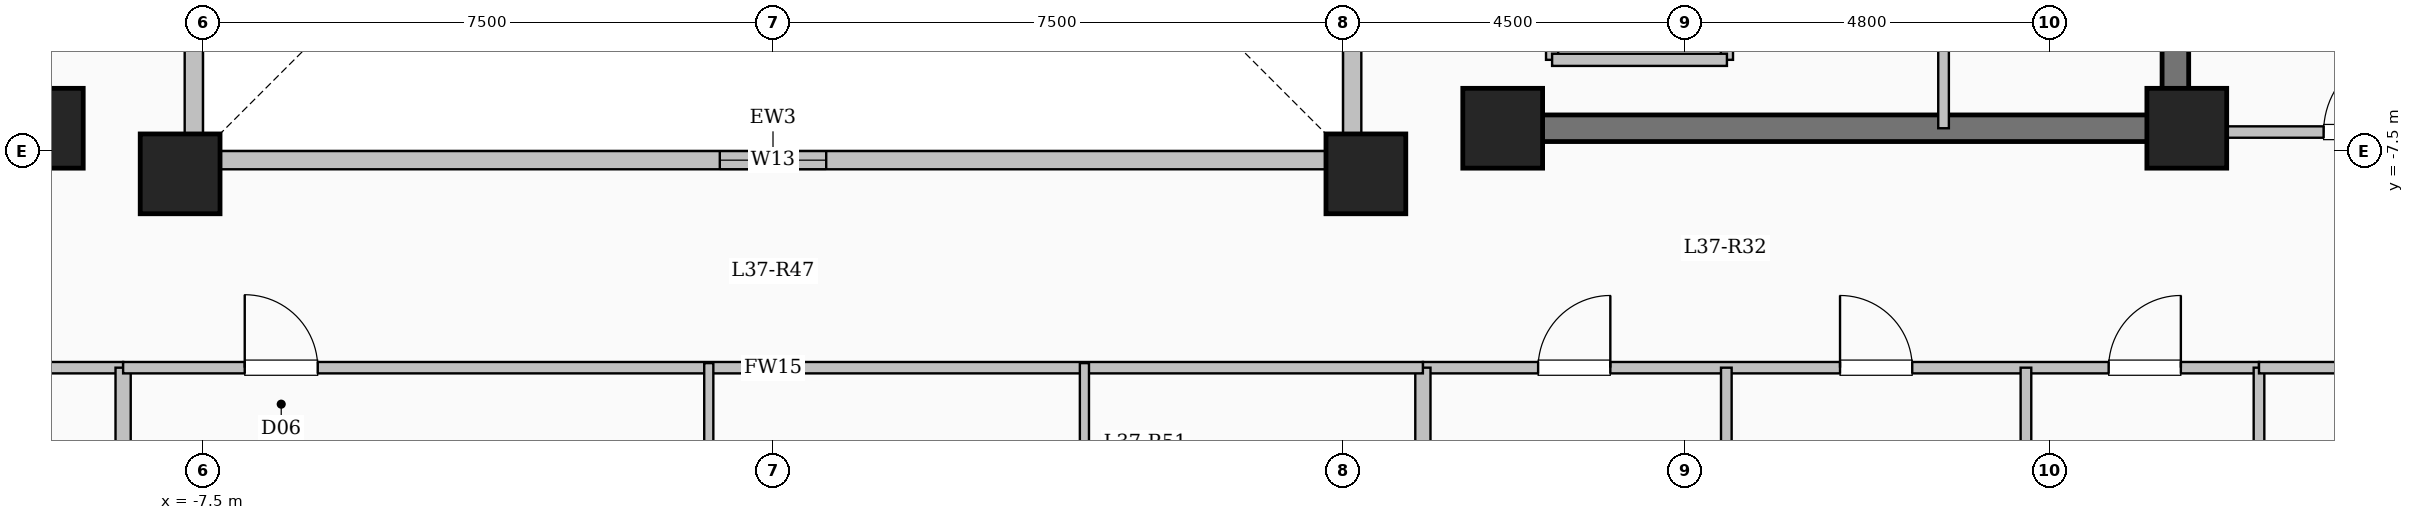
"""IFC4 building model, lengths in metres.
Left out: names, types, materials, properties, quantities, classifications, styles, units other than length and angle.
Written with IfcOpenShell. Run it as: python <this file> out.ifc"""

import sys

from ifc_helpers import new_model, si_unit, direction, frame, frame_2d, origin, origin_2d, place, context, subcontext, project, spatial, rectangle, extrude, element, fill, save


model = new_model("IFC4")
c1 = context("Model", 3, precision=1e-05, world=origin(), true_north=direction((0.0, 1.0)))
c2 = subcontext(c1, "Body", "Model", "MODEL_VIEW")
j1 = project(units=[si_unit("LENGTHUNIT", "METRE"), si_unit("PLANEANGLEUNIT", "RADIAN")], contexts=[c1])
p1 = place(None, origin())
s1 = spatial("IfcSite", under=j1, at=p1, CompositionType="ELEMENT")
p2 = place(p1, origin())
s2 = spatial("IfcBuilding", under=s1, at=p2, CompositionType="ELEMENT")
p3 = place(p2, frame((0.0, 0.0, 139.3)))
s3 = spatial("IfcBuildingStorey", under=s2, at=p3, CompositionType="ELEMENT", Elevation=139.3)
for number, where, z_axis, x_axis in (
    (1, (-7.8, -7.8, 0.0), (0.0, 0.0, 1.0), (1.0, 0.0, 0.0)),
    (2, (7.8, -7.8, 0.0), (0.0, 0.0, 1.0), (1.0, 0.0, 0.0)),
    (3, (-9.6, -7.2, 0.0), (0.0, 0.0, 1.0), (1.0, 0.0, 0.0)),
    (4, (9.6, -7.2, 0.0), (0.0, 0.0, 1.0), (1.0, 0.0, 0.0)),
    (5, (18.6, -7.2, 0.0), (0.0, 0.0, 1.0), (1.0, 0.0, 0.0)),
):
    element("IfcColumn", number, at=place(p3, frame(where, z_axis=z_axis, x_axis=x_axis)), inside=s3, PredefinedType="COLUMN", context=c2, shape_type="SweptSolid", body=[
        extrude(rectangle(XDim=1.05, YDim=1.05, at=origin_2d()), origin(), (0.0, 0.0, 1.0), 3.35),
    ])
p4 = place(p3, frame((-7.62, -7.62, 0.0), z_axis=(0.0, 0.0, 1.0), x_axis=(1.0, 0.0, 0.0)))
e6 = element("IfcWall", 6, at=p4, inside=s3, PredefinedType="SOLIDWALL", context=c2, shape_type="SweptSolid", body=[
    extrude(rectangle(XDim=15.24, YDim=0.24, at=frame_2d((7.62, 0.0))), origin(), (0.0, 0.0, 1.0), 3.1),
])
p5 = place(p4, frame((6.92, 0.0, 0.95)))
e7 = element("IfcOpeningElement", 7, at=p5, cuts=e6, PredefinedType="OPENING", context=c2, shape_type="SweptSolid", body=[
    extrude(rectangle(XDim=1.4, YDim=1.5, at=frame_2d((0.7, 0.75))), frame((0.0, 0.13, 0.0), z_axis=(0.0, -1.0, 0.0), x_axis=(1.0, 0.0, 0.0)), (0.0, 0.0, 1.0), 0.26),
])
p6 = place(p3, frame((7.62, -7.62, 0.0), z_axis=(0.0, 0.0, 1.0), x_axis=(0.0, 1.0, 0.0)))
e8 = element("IfcWall", 8, at=p6, inside=s3, PredefinedType="SOLIDWALL", context=c2, shape_type="SweptSolid", body=[
    extrude(rectangle(XDim=15.24, YDim=0.24, at=frame_2d((7.62, 0.0))), origin(), (0.0, 0.0, 1.0), 3.1),
])
p7 = place(p6, frame((6.92, 0.0, 0.95)))
e9 = element("IfcOpeningElement", 9, at=p7, cuts=e8, PredefinedType="OPENING", context=c2, shape_type="SweptSolid", body=[
    extrude(rectangle(XDim=1.4, YDim=1.5, at=frame_2d((0.7, 0.75))), frame((0.0, 0.13, 0.0), z_axis=(0.0, -1.0, 0.0), x_axis=(1.0, 0.0, 0.0)), (0.0, 0.0, 1.0), 0.26),
])
p8 = place(p3, frame((-7.62, 7.62, 0.0), z_axis=(0.0, 0.0, 1.0), x_axis=(0.0, -1.0, 0.0)))
e10 = element("IfcWall", 10, at=p8, inside=s3, PredefinedType="SOLIDWALL", context=c2, shape_type="SweptSolid", body=[
    extrude(rectangle(XDim=15.24, YDim=0.24, at=frame_2d((7.62, 0.0))), origin(), (0.0, 0.0, 1.0), 3.1),
])
p9 = place(p8, frame((6.92, 0.0, 0.95)))
e11 = element("IfcOpeningElement", 11, at=p9, cuts=e10, PredefinedType="OPENING", context=c2, shape_type="SweptSolid", body=[
    extrude(rectangle(XDim=1.4, YDim=1.5, at=frame_2d((0.7, 0.75))), frame((0.0, 0.13, 0.0), z_axis=(0.0, -1.0, 0.0), x_axis=(1.0, 0.0, 0.0)), (0.0, 0.0, 1.0), 0.26),
])
p10 = place(p3, frame((10.25, -6.3, 0.0), z_axis=(0.0, 0.0, 1.0), x_axis=(0.0, 1.0, 0.0)))
e12 = element("IfcWall", 12, at=p10, inside=s3, PredefinedType="SOLIDWALL", context=c2, shape_type="SweptSolid", body=[
    extrude(rectangle(XDim=2.6, YDim=0.16, at=frame_2d((1.3, 0.0))), origin(), (0.0, 0.0, 1.0), 3.1),
])
p11 = place(p10, frame((0.75, 0.0, 0.0)))
e13 = element("IfcOpeningElement", 13, at=p11, cuts=e12, PredefinedType="OPENING", context=c2, shape_type="SweptSolid", body=[
    extrude(rectangle(XDim=1.1, YDim=2.15, at=frame_2d((0.55, 1.075))), frame((0.0, 0.09, 0.0), z_axis=(0.0, -1.0, 0.0), x_axis=(1.0, 0.0, 0.0)), (0.0, 0.0, 1.0), 0.18),
])
p12 = place(p3, frame((12.55, -6.3, 0.0), z_axis=(0.0, 0.0, 1.0), x_axis=(0.0, 1.0, 0.0)))
e14 = element("IfcWall", 14, at=p12, inside=s3, PredefinedType="SOLIDWALL", context=c2, shape_type="SweptSolid", body=[
    extrude(rectangle(XDim=2.6, YDim=0.16, at=frame_2d((1.3, 0.0))), origin(), (0.0, 0.0, 1.0), 3.1),
])
p13 = place(p3, frame((10.25, -6.3, 0.0), z_axis=(0.0, 0.0, 1.0), x_axis=(1.0, 0.0, 0.0)))
e15 = element("IfcWall", 15, at=p13, inside=s3, PredefinedType="SOLIDWALL", context=c2, shape_type="SweptSolid", body=[
    extrude(rectangle(XDim=2.3, YDim=0.16, at=frame_2d((1.15, 0.0))), origin(), (0.0, 0.0, 1.0), 3.1),
])
p14 = place(p3, frame((18.45, -7.375, 0.0), z_axis=(0.0, 0.0, 1.0), x_axis=(0.0, 1.0, 0.0)))
e16 = element("IfcWall", 16, at=p14, inside=s3, PredefinedType="SHEAR", context=c2, shape_type="SweptSolid", body=[
    extrude(rectangle(XDim=14.05, YDim=0.35, at=frame_2d((7.025, 0.0))), origin(), (0.0, 0.0, 1.0), 3.35),
])
p15 = place(p3, frame((10.075, -7.2, 0.0), z_axis=(0.0, 0.0, 1.0), x_axis=(1.0, 0.0, 0.0)))
e17 = element("IfcWall", 17, at=p15, inside=s3, PredefinedType="SHEAR", context=c2, shape_type="SweptSolid", body=[
    extrude(rectangle(XDim=8.55, YDim=0.35, at=frame_2d((4.275, 0.0))), origin(), (0.0, 0.0, 1.0), 3.35),
])
p16 = place(p3, frame((15.4, -7.2, 0.0), z_axis=(0.0, 0.0, 1.0), x_axis=(0.0, 1.0, 0.0)))
e18 = element("IfcWall", 18, at=p16, inside=s3, PredefinedType="PARTITIONING", context=c2, shape_type="SweptSolid", body=[
    extrude(rectangle(XDim=10.45, YDim=0.14, at=frame_2d((5.225, 0.0))), origin(), (0.0, 0.0, 1.0), 3.1),
])
p17 = place(p16, frame((9.25, 0.0, 0.0)))
e19 = element("IfcOpeningElement", 19, at=p17, cuts=e18, PredefinedType="OPENING", context=c2, shape_type="SweptSolid", body=[
    extrude(rectangle(XDim=0.9, YDim=2.08, at=frame_2d((0.45, 1.04))), frame((0.0, 0.08, 0.0), z_axis=(0.0, -1.0, 0.0), x_axis=(1.0, 0.0, 0.0)), (0.0, 0.0, 1.0), 0.16),
])
p18 = place(p3, frame((-19.55, -10.35, 0.0), z_axis=(0.0, 0.0, 1.0), x_axis=(1.0, 0.0, 0.0)))
e20 = element("IfcWall", 20, at=p18, inside=s3, PredefinedType="PARTITIONING", context=c2, shape_type="SweptSolid", body=[
    extrude(rectangle(XDim=11.0, YDim=0.15, at=frame_2d((5.5, 0.0))), origin(), (0.0, 0.0, 1.0), 3.1),
])
p19 = place(p18, frame((1.466, 0.0, 0.0)))
e21 = element("IfcOpeningElement", 21, at=p19, cuts=e20, PredefinedType="OPENING", context=c2, shape_type="SweptSolid", body=[
    extrude(rectangle(XDim=0.95, YDim=2.15, at=frame_2d((0.475, 1.075))), frame((0.0, 0.085, 0.0), z_axis=(0.0, -1.0, 0.0), x_axis=(1.0, 0.0, 0.0)), (0.0, 0.0, 1.0), 0.17),
])
p20 = place(p18, frame((5.438, 0.0, 0.0)))
e22 = element("IfcOpeningElement", 22, at=p20, cuts=e20, PredefinedType="OPENING", context=c2, shape_type="SweptSolid", body=[
    extrude(rectangle(XDim=0.95, YDim=2.15, at=frame_2d((0.475, 1.075))), frame((0.0, 0.085, 0.0), z_axis=(0.0, -1.0, 0.0), x_axis=(1.0, 0.0, 0.0)), (0.0, 0.0, 1.0), 0.17),
])
p21 = place(p18, frame((8.972, 0.0, 0.0)))
e23 = element("IfcOpeningElement", 23, at=p21, cuts=e20, PredefinedType="OPENING", context=c2, shape_type="SweptSolid", body=[
    extrude(rectangle(XDim=0.95, YDim=2.15, at=frame_2d((0.475, 1.075))), frame((0.0, 0.085, 0.0), z_axis=(0.0, -1.0, 0.0), x_axis=(1.0, 0.0, 0.0)), (0.0, 0.0, 1.0), 0.17),
])
p22 = place(p3, frame((8.55, -10.35, 0.0), z_axis=(0.0, 0.0, 1.0), x_axis=(1.0, 0.0, 0.0)))
e24 = element("IfcWall", 24, at=p22, inside=s3, PredefinedType="PARTITIONING", context=c2, shape_type="SweptSolid", body=[
    extrude(rectangle(XDim=11.0, YDim=0.15, at=frame_2d((5.5, 0.0))), origin(), (0.0, 0.0, 1.0), 3.1),
])
p23 = place(p22, frame((1.516, 0.0, 0.0)))
e25 = element("IfcOpeningElement", 25, at=p23, cuts=e24, PredefinedType="OPENING", context=c2, shape_type="SweptSolid", body=[
    extrude(rectangle(XDim=0.95, YDim=2.15, at=frame_2d((0.475, 1.075))), frame((0.0, 0.085, 0.0), z_axis=(0.0, -1.0, 0.0), x_axis=(1.0, 0.0, 0.0)), (0.0, 0.0, 1.0), 0.17),
])
p24 = place(p22, frame((5.488, 0.0, 0.0)))
e26 = element("IfcOpeningElement", 26, at=p24, cuts=e24, PredefinedType="OPENING", context=c2, shape_type="SweptSolid", body=[
    extrude(rectangle(XDim=0.95, YDim=2.15, at=frame_2d((0.475, 1.075))), frame((0.0, 0.085, 0.0), z_axis=(0.0, -1.0, 0.0), x_axis=(1.0, 0.0, 0.0)), (0.0, 0.0, 1.0), 0.17),
])
p25 = place(p22, frame((9.022, 0.0, 0.0)))
e27 = element("IfcOpeningElement", 27, at=p25, cuts=e24, PredefinedType="OPENING", context=c2, shape_type="SweptSolid", body=[
    extrude(rectangle(XDim=0.95, YDim=2.15, at=frame_2d((0.475, 1.075))), frame((0.0, 0.085, 0.0), z_axis=(0.0, -1.0, 0.0), x_axis=(1.0, 0.0, 0.0)), (0.0, 0.0, 1.0), 0.17),
])
for number, where, z_axis, x_axis in (
    (28, (12.542, -21.15, 0.0), (0.0, 0.0, 1.0), (0.0, 1.0, 0.0)),
    (29, (16.484, -21.15, 0.0), (0.0, 0.0, 1.0), (0.0, 1.0, 0.0)),
):
    element("IfcWall", number, at=place(p3, frame(where, z_axis=z_axis, x_axis=x_axis)), inside=s3, PredefinedType="PARTITIONING", context=c2, shape_type="SweptSolid", body=[
        extrude(rectangle(XDim=10.8, YDim=0.14, at=frame_2d((5.4, 0.0))), origin(), (0.0, 0.0, 1.0), 3.1),
    ])
for number, where, z_axis, x_axis in (
    (30, (-8.55, -21.804, 0.0), (0.0, 0.0, 1.0), (0.0, 1.0, 0.0)),
    (31, (8.55, -21.804, 0.0), (0.0, 0.0, 1.0), (0.0, 1.0, 0.0)),
):
    element("IfcWall", number, at=place(p3, frame(where, z_axis=z_axis, x_axis=x_axis)), inside=s3, PredefinedType="SOLIDWALL", context=c2, shape_type="SweptSolid", body=[
        extrude(rectangle(XDim=11.454, YDim=0.2, at=frame_2d((5.727, 0.0))), origin(), (0.0, 0.0, 1.0), 3.1),
    ])
p26 = place(p3, frame((-8.55, -10.35, 0.0), z_axis=(0.0, 0.0, 1.0), x_axis=(1.0, 0.0, 0.0)))
e32 = element("IfcWall", 32, at=p26, inside=s3, PredefinedType="PARTITIONING", context=c2, shape_type="SweptSolid", body=[
    extrude(rectangle(XDim=17.1, YDim=0.15, at=frame_2d((8.55, 0.0))), origin(), (0.0, 0.0, 1.0), 3.1),
])
p27 = place(p26, frame((1.6, 0.0, 0.0)))
e33 = element("IfcOpeningElement", 33, at=p27, cuts=e32, PredefinedType="OPENING", context=c2, shape_type="SweptSolid", body=[
    extrude(rectangle(XDim=0.96, YDim=2.15, at=frame_2d((0.48, 1.075))), frame((0.0, 0.085, 0.0), z_axis=(0.0, -1.0, 0.0), x_axis=(1.0, 0.0, 0.0)), (0.0, 0.0, 1.0), 0.17),
])
p28 = place(p3, frame((-0.845, -22.68, 0.0), z_axis=(0.0, 0.0, 1.0), x_axis=(0.0, 1.0, 0.0)))
e34 = element("IfcWall", 34, at=p28, inside=s3, PredefinedType="PARTITIONING", context=c2, shape_type="SweptSolid", body=[
    extrude(rectangle(XDim=12.39, YDim=0.12, at=frame_2d((6.195, 0.0))), origin(), (0.0, 0.0, 1.0), 3.1),
])
p29 = place(p28, frame((8.395, 0.0, 0.0)))
e35 = element("IfcOpeningElement", 35, at=p29, cuts=e34, PredefinedType="OPENING", context=c2, shape_type="SweptSolid", body=[
    extrude(rectangle(XDim=1.08, YDim=2.15, at=frame_2d((0.54, 1.075))), frame((0.0, 0.07, 0.0), z_axis=(0.0, -1.0, 0.0), x_axis=(1.0, 0.0, 0.0)), (0.0, 0.0, 1.0), 0.14),
])
p30 = place(p3, frame((4.097, -12.92, 0.0), z_axis=(0.0, 0.0, 1.0), x_axis=(0.0, 1.0, 0.0)))
e36 = element("IfcWall", 36, at=p30, inside=s3, PredefinedType="PARTITIONING", context=c2, shape_type="SweptSolid", body=[
    extrude(rectangle(XDim=2.63, YDim=0.12, at=frame_2d((1.315, 0.0))), origin(), (0.0, 0.0, 1.0), 3.1),
])
p31 = place(p3, frame((18.45, -7.25, 0.0), z_axis=(0.0, 0.0, 1.0), x_axis=(1.0, 0.0, 0.0)))
e37 = element("IfcWall", 37, at=p31, inside=s3, PredefinedType="PARTITIONING", context=c2, shape_type="SweptSolid", body=[
    extrude(rectangle(XDim=6.63, YDim=0.15, at=frame_2d((3.315, 0.0))), origin(), (0.0, 0.0, 1.0), 3.1),
])
p32 = place(p31, frame((1.95, 0.0, 0.0)))
e38 = element("IfcOpeningElement", 38, at=p32, cuts=e37, PredefinedType="OPENING", context=c2, shape_type="SweptSolid", body=[
    extrude(rectangle(XDim=1.08, YDim=2.15, at=frame_2d((0.54, 1.075))), frame((0.0, 0.085, 0.0), z_axis=(0.0, -1.0, 0.0), x_axis=(1.0, 0.0, 0.0)), (0.0, 0.0, 1.0), 0.17),
])
p33 = place(p3, frame((19.55, -17.25, 0.0), z_axis=(0.0, 0.0, 1.0), x_axis=(0.0, 1.0, 0.0)))
e39 = element("IfcWall", 39, at=p33, inside=s3, PredefinedType="PARTITIONING", context=c2, shape_type="SweptSolid", body=[
    extrude(rectangle(XDim=6.9, YDim=0.14, at=frame_2d((3.45, 0.0))), origin(), (0.0, 0.0, 1.0), 3.1),
])
p34 = place(p3, frame((19.55, -10.35, 0.0), z_axis=(0.0, 0.0, 1.0), x_axis=(1.0, 0.0, 0.0)))
e40 = element("IfcWall", 40, at=p34, inside=s3, PredefinedType="PARTITIONING", context=c2, shape_type="SweptSolid", body=[
    extrude(rectangle(XDim=5.53, YDim=0.15, at=frame_2d((2.765, 0.0))), origin(), (0.0, 0.0, 1.0), 3.1),
])
p35 = place(p34, frame((2.29, 0.0, 0.0)))
e41 = element("IfcOpeningElement", 41, at=p35, cuts=e40, PredefinedType="OPENING", context=c2, shape_type="SweptSolid", body=[
    extrude(rectangle(XDim=0.95, YDim=2.15, at=frame_2d((0.475, 1.075))), frame((0.0, 0.085, 0.0), z_axis=(0.0, -1.0, 0.0), x_axis=(1.0, 0.0, 0.0)), (0.0, 0.0, 1.0), 0.17),
])
p36 = place(p5, origin())
e42 = element("IfcWindow", 42, at=p36, inside=s3, PartitioningType="SINGLE_PANEL", PredefinedType="WINDOW", context=c2, shape_type="SweptSolid", body=[
    extrude(rectangle(XDim=1.4, YDim=1.5, at=frame_2d((0.7, 0.75))), frame((0.0, 0.03, 0.0), z_axis=(0.0, -1.0, 0.0), x_axis=(1.0, 0.0, 0.0)), (0.0, 0.0, 1.0), 0.06),
])
fill(e7, e42)
p37 = place(p23, origin())
e43 = element("IfcDoor", 43, at=p37, inside=s3, OperationType="SINGLE_SWING_RIGHT", PredefinedType="DOOR", context=c2, shape_type="SweptSolid", body=[
    extrude(rectangle(XDim=0.95, YDim=2.15, at=frame_2d((0.475, 1.075))), frame((0.0, 0.025, 0.0), z_axis=(0.0, -1.0, 0.0), x_axis=(1.0, 0.0, 0.0)), (0.0, 0.0, 1.0), 0.05),
])
fill(e25, e43)
p38 = place(p24, origin())
e44 = element("IfcDoor", 44, at=p38, inside=s3, OperationType="SINGLE_SWING_LEFT", PredefinedType="DOOR", context=c2, shape_type="SweptSolid", body=[
    extrude(rectangle(XDim=0.95, YDim=2.15, at=frame_2d((0.475, 1.075))), frame((0.0, 0.025, 0.0), z_axis=(0.0, -1.0, 0.0), x_axis=(1.0, 0.0, 0.0)), (0.0, 0.0, 1.0), 0.05),
])
fill(e26, e44)
p39 = place(p25, origin())
e45 = element("IfcDoor", 45, at=p39, inside=s3, OperationType="SINGLE_SWING_RIGHT", PredefinedType="DOOR", context=c2, shape_type="SweptSolid", body=[
    extrude(rectangle(XDim=0.95, YDim=2.15, at=frame_2d((0.475, 1.075))), frame((0.0, 0.025, 0.0), z_axis=(0.0, -1.0, 0.0), x_axis=(1.0, 0.0, 0.0)), (0.0, 0.0, 1.0), 0.05),
])
fill(e27, e45)
p40 = place(p27, origin())
e46 = element("IfcDoor", 46, at=p40, inside=s3, OperationType="SINGLE_SWING_LEFT", PredefinedType="DOOR", context=c2, shape_type="SweptSolid", body=[
    extrude(rectangle(XDim=0.96, YDim=2.15, at=frame_2d((0.48, 1.075))), frame((0.0, 0.025, 0.0), z_axis=(0.0, -1.0, 0.0), x_axis=(1.0, 0.0, 0.0)), (0.0, 0.0, 1.0), 0.05),
])
fill(e33, e46)
p41 = place(p32, origin())
e47 = element("IfcDoor", 47, at=p41, inside=s3, OperationType="SINGLE_SWING_RIGHT", PredefinedType="DOOR", context=c2, shape_type="SweptSolid", body=[
    extrude(rectangle(XDim=1.08, YDim=2.15, at=frame_2d((0.54, 1.075))), frame((0.0, 0.025, 0.0), z_axis=(0.0, -1.0, 0.0), x_axis=(1.0, 0.0, 0.0)), (0.0, 0.0, 1.0), 0.05),
])
fill(e38, e47)
save(model, sys.argv[1])
